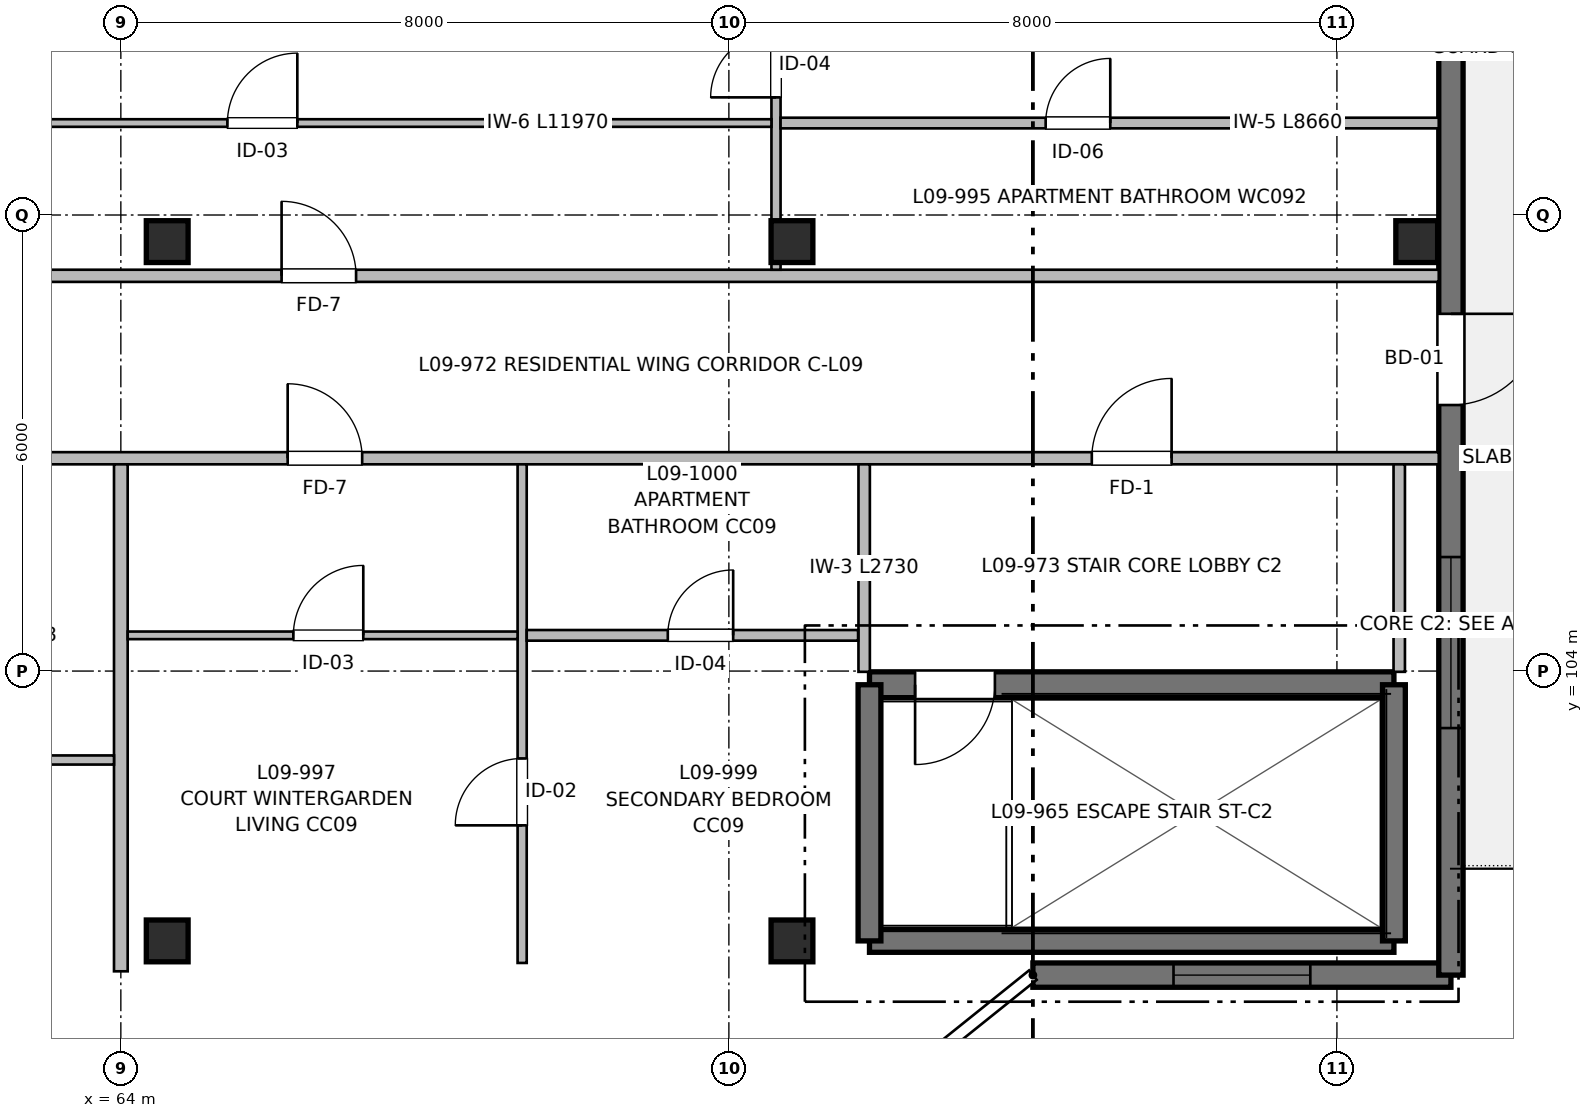
"""IFC4 building model, lengths in metres.
Left out: names, types, materials, properties, quantities, classifications, styles, units other than length and angle.
Written with IfcOpenShell. Run it as: python <this file> out.ifc"""

import sys

from ifc_helpers import new_model, si_unit, direction, frame, frame_2d, origin, origin_2d, place, context, subcontext, project, spatial, rectangle, extrude, element, fill, save


model = new_model("IFC4")
c1 = context("Model", 3, precision=1e-05, world=origin(), true_north=direction((0.0, 1.0)))
c2 = subcontext(c1, "Body", "Model", "MODEL_VIEW")
j1 = project(units=[si_unit("LENGTHUNIT", "METRE"), si_unit("PLANEANGLEUNIT", "RADIAN")], contexts=[c1])
p1 = place(None, origin())
s1 = spatial("IfcSite", under=j1, at=p1, CompositionType="ELEMENT")
p2 = place(p1, origin())
s2 = spatial("IfcBuilding", under=s1, at=p2, CompositionType="ELEMENT")
p3 = place(p2, frame((0.0, 0.0, 29.76)))
s3 = spatial("IfcBuildingStorey", under=s2, at=p3, CompositionType="ELEMENT", Elevation=29.76)
for number, where, z_axis, x_axis in (
    (1, (64.61, 100.45, 0.0), (0.0, 0.0, 1.0), (1.0, 0.0, 0.0)),
    (2, (64.61, 109.65, 0.0), (0.0, 0.0, 1.0), (1.0, 0.0, 0.0)),
    (3, (72.83, 100.45, 0.0), (0.0, 0.0, 1.0), (1.0, 0.0, 0.0)),
    (4, (72.83, 109.65, 0.0), (0.0, 0.0, 1.0), (1.0, 0.0, 0.0)),
    (5, (81.05, 109.65, 0.0), (0.0, 0.0, 1.0), (1.0, 0.0, 0.0)),
):
    element("IfcColumn", number, at=place(p3, frame(where, z_axis=z_axis, x_axis=x_axis)), inside=s3, PredefinedType="COLUMN", context=c2, shape_type="SweptSolid", body=[
        extrude(rectangle(XDim=0.55, YDim=0.55, at=origin_2d()), origin(), (0.0, 0.0, 1.0), 3.2),
    ])
p4 = place(p3, frame((73.85, 100.45, 0.0), z_axis=(0.0, 0.0, 1.0), x_axis=(1.0, 0.0, 0.0)))
e6 = element("IfcWall", 6, at=p4, inside=s3, PredefinedType="SHEAR", context=c2, shape_type="SweptSolid", body=[
    extrude(rectangle(XDim=6.9, YDim=0.3, at=frame_2d((3.45, 0.0))), origin(), (0.0, 0.0, 1.0), 3.2),
])
p5 = place(p3, frame((80.75, 103.82, 0.0), z_axis=(0.0, 0.0, 1.0), x_axis=(-1.0, 0.0, 0.0)))
e7 = element("IfcWall", 7, at=p5, inside=s3, PredefinedType="SHEAR", context=c2, shape_type="SweptSolid", body=[
    extrude(rectangle(XDim=6.9, YDim=0.34, at=frame_2d((3.45, 0.0))), origin(), (0.0, 0.0, 1.0), 3.2),
])
p6 = place(p5, frame((5.25, 0.0, 0.0)))
e8 = element("IfcOpeningElement", 8, at=p6, cuts=e7, PredefinedType="OPENING", context=c2, shape_type="SweptSolid", body=[
    extrude(rectangle(XDim=1.05, YDim=2.15, at=frame_2d((0.525, 1.075))), frame((0.0, 0.18, 0.0), z_axis=(0.0, -1.0, 0.0), x_axis=(1.0, 0.0, 0.0)), (0.0, 0.0, 1.0), 0.36),
])
for number, where, z_axis, x_axis in (
    (9, (73.85, 103.82, 0.0), (0.0, 0.0, 1.0), (0.0, -1.0, 0.0)),
    (10, (80.75, 100.45, 0.0), (0.0, 0.0, 1.0), (0.0, 1.0, 0.0)),
):
    element("IfcWall", number, at=place(p3, frame(where, z_axis=z_axis, x_axis=x_axis)), inside=s3, PredefinedType="SHEAR", context=c2, shape_type="SweptSolid", body=[
        extrude(rectangle(XDim=3.37, YDim=0.3, at=frame_2d((1.685, 0.0))), origin(), (0.0, 0.0, 1.0), 3.2),
    ])
p7 = place(p3, frame((81.5, 100.0, 0.0), z_axis=(0.0, 0.0, 1.0), x_axis=(-1.0, 0.0, 0.0)))
e11 = element("IfcWall", 11, at=p7, inside=s3, PredefinedType="SHEAR", context=c2, shape_type="SweptSolid", body=[
    extrude(rectangle(XDim=5.5, YDim=0.32, at=frame_2d((2.75, 0.0))), origin(), (0.0, 0.0, 1.0), 2.98),
])
p8 = place(p7, frame((1.85, 0.0, 0.72)))
e12 = element("IfcOpeningElement", 12, at=p8, cuts=e11, PredefinedType="OPENING", context=c2, shape_type="SweptSolid", body=[
    extrude(rectangle(XDim=1.8, YDim=1.5, at=frame_2d((0.9, 0.75))), frame((0.0, 0.17, 0.0), z_axis=(0.0, -1.0, 0.0), x_axis=(1.0, 0.0, 0.0)), (0.0, 0.0, 1.0), 0.34),
])
p9 = place(p3, frame((81.5, 113.6, 0.0), z_axis=(0.0, 0.0, 1.0), x_axis=(0.0, -1.0, 0.0)))
e13 = element("IfcWall", 13, at=p9, inside=s3, PredefinedType="SHEAR", context=c2, shape_type="SweptSolid", body=[
    extrude(rectangle(XDim=13.6, YDim=0.32, at=frame_2d((6.8, 0.0))), origin(), (0.0, 0.0, 1.0), 2.98),
])
p10 = place(p9, frame((4.9, 0.0, 0.0)))
e14 = element("IfcOpeningElement", 14, at=p10, cuts=e13, PredefinedType="OPENING", context=c2, shape_type="SweptSolid", body=[
    extrude(rectangle(XDim=1.2, YDim=2.2, at=frame_2d((0.6, 1.1))), frame((0.0, 0.17, 0.0), z_axis=(0.0, -1.0, 0.0), x_axis=(1.0, 0.0, 0.0)), (0.0, 0.0, 1.0), 0.34),
])
p11 = place(p9, frame((8.1, 0.0, 0.72)))
e15 = element("IfcOpeningElement", 15, at=p11, cuts=e13, PredefinedType="OPENING", context=c2, shape_type="SweptSolid", body=[
    extrude(rectangle(XDim=2.25, YDim=1.5, at=frame_2d((1.125, 0.75))), frame((0.0, 0.17, 0.0), z_axis=(0.0, -1.0, 0.0), x_axis=(1.0, 0.0, 0.0)), (0.0, 0.0, 1.0), 0.34),
])
p12 = place(p3, frame((57.2, 106.8, 0.0), z_axis=(0.0, 0.0, 1.0), x_axis=(1.0, 0.0, 0.0)))
e16 = element("IfcWall", 16, at=p12, inside=s3, PredefinedType="PARTITIONING", context=c2, shape_type="SweptSolid", body=[
    extrude(rectangle(XDim=24.14, YDim=0.16, at=frame_2d((12.07, 0.0))), origin(), (0.0, 0.0, 1.0), 2.935),
])
p13 = place(p12, frame((19.575, 0.0, 0.0)))
e17 = element("IfcOpeningElement", 17, at=p13, cuts=e16, PredefinedType="OPENING", context=c2, shape_type="SweptSolid", body=[
    extrude(rectangle(XDim=1.05, YDim=2.15, at=frame_2d((0.525, 1.075))), frame((0.0, 0.09, 0.0), z_axis=(0.0, -1.0, 0.0), x_axis=(1.0, 0.0, 0.0)), (0.0, 0.0, 1.0), 0.18),
])
p14 = place(p12, frame((8.995, 0.0, 0.0)))
e18 = element("IfcOpeningElement", 18, at=p14, cuts=e16, PredefinedType="OPENING", context=c2, shape_type="SweptSolid", body=[
    extrude(rectangle(XDim=0.98, YDim=2.15, at=frame_2d((0.49, 1.075))), frame((0.0, 0.09, 0.0), z_axis=(0.0, -1.0, 0.0), x_axis=(1.0, 0.0, 0.0)), (0.0, 0.0, 1.0), 0.18),
])
p15 = place(p3, frame((39.66, 109.2, 0.0), z_axis=(0.0, 0.0, 1.0), x_axis=(1.0, 0.0, 0.0)))
e19 = element("IfcWall", 19, at=p15, inside=s3, PredefinedType="PARTITIONING", context=c2, shape_type="SweptSolid", body=[
    extrude(rectangle(XDim=41.68, YDim=0.16, at=frame_2d((20.84, 0.0))), origin(), (0.0, 0.0, 1.0), 2.935),
])
p16 = place(p15, frame((5.525, 0.0, 0.0)))
e20 = element("IfcOpeningElement", 20, at=p16, cuts=e19, PredefinedType="OPENING", context=c2, shape_type="SweptSolid", body=[
    extrude(rectangle(XDim=0.98, YDim=2.15, at=frame_2d((0.49, 1.075))), frame((0.0, 0.09, 0.0), z_axis=(0.0, -1.0, 0.0), x_axis=(1.0, 0.0, 0.0)), (0.0, 0.0, 1.0), 0.18),
])
p17 = place(p15, frame((26.455, 0.0, 0.0)))
e21 = element("IfcOpeningElement", 21, at=p17, cuts=e19, PredefinedType="OPENING", context=c2, shape_type="SweptSolid", body=[
    extrude(rectangle(XDim=0.98, YDim=2.15, at=frame_2d((0.49, 1.075))), frame((0.0, 0.09, 0.0), z_axis=(0.0, -1.0, 0.0), x_axis=(1.0, 0.0, 0.0)), (0.0, 0.0, 1.0), 0.18),
])
p18 = place(p3, frame((64.0, 100.05, 0.0), z_axis=(0.0, 0.0, 1.0), x_axis=(0.0, 1.0, 0.0)))
e22 = element("IfcWall", 22, at=p18, inside=s3, PredefinedType="PARTITIONING", context=c2, shape_type="SweptSolid", body=[
    extrude(rectangle(XDim=6.67, YDim=0.18, at=frame_2d((3.335, 0.0))), origin(), (0.0, 0.0, 1.0), 2.935),
])
for number, where, z_axis, x_axis in (
    (23, (73.78, 103.99, 0.0), (0.0, 0.0, 1.0), (0.0, 1.0, 0.0)),
    (24, (80.82, 103.99, 0.0), (0.0, 0.0, 1.0), (0.0, 1.0, 0.0)),
):
    element("IfcWall", number, at=place(p3, frame(where, z_axis=z_axis, x_axis=x_axis)), inside=s3, PredefinedType="PARTITIONING", context=c2, shape_type="SweptSolid", body=[
        extrude(rectangle(XDim=2.73, YDim=0.15, at=frame_2d((1.365, 0.0))), origin(), (0.0, 0.0, 1.0), 2.935),
    ])
p19 = place(p3, frame((59.72, 102.83, 0.0), z_axis=(0.0, 0.0, 1.0), x_axis=(1.0, 0.0, 0.0)))
e25 = element("IfcWall", 25, at=p19, inside=s3, PredefinedType="PARTITIONING", context=c2, shape_type="SweptSolid", body=[
    extrude(rectangle(XDim=4.19, YDim=0.12, at=frame_2d((2.095, 0.0))), origin(), (0.0, 0.0, 1.0), 2.935),
])
p20 = place(p19, frame((1.655, 0.0, 0.0)))
e26 = element("IfcOpeningElement", 26, at=p20, cuts=e25, PredefinedType="OPENING", context=c2, shape_type="SweptSolid", body=[
    extrude(rectangle(XDim=0.88, YDim=2.1, at=frame_2d((0.44, 1.05))), frame((0.0, 0.07, 0.0), z_axis=(0.0, -1.0, 0.0), x_axis=(1.0, 0.0, 0.0)), (0.0, 0.0, 1.0), 0.14),
])
p21 = place(p3, frame((72.62, 109.28, 0.0), z_axis=(0.0, 0.0, 1.0), x_axis=(0.0, 1.0, 0.0)))
e27 = element("IfcWall", 27, at=p21, inside=s3, PredefinedType="PARTITIONING", context=c2, shape_type="SweptSolid", body=[
    extrude(rectangle(XDim=4.19, YDim=0.12, at=frame_2d((2.095, 0.0))), origin(), (0.0, 0.0, 1.0), 2.935),
])
p22 = place(p21, frame((2.268, 0.0, 0.0)))
e28 = element("IfcOpeningElement", 28, at=p22, cuts=e27, PredefinedType="OPENING", context=c2, shape_type="SweptSolid", body=[
    extrude(rectangle(XDim=0.86, YDim=2.1, at=frame_2d((0.43, 1.05))), frame((0.0, 0.07, 0.0), z_axis=(0.0, -1.0, 0.0), x_axis=(1.0, 0.0, 0.0)), (0.0, 0.0, 1.0), 0.14),
])
p23 = place(p3, frame((72.68, 111.21, 0.0), z_axis=(0.0, 0.0, 1.0), x_axis=(1.0, 0.0, 0.0)))
e29 = element("IfcWall", 29, at=p23, inside=s3, PredefinedType="PARTITIONING", context=c2, shape_type="SweptSolid", body=[
    extrude(rectangle(XDim=8.66, YDim=0.14, at=frame_2d((4.33, 0.0))), origin(), (0.0, 0.0, 1.0), 2.935),
])
p24 = place(p23, frame((3.488, 0.0, 0.0)))
e30 = element("IfcOpeningElement", 30, at=p24, cuts=e29, PredefinedType="OPENING", context=c2, shape_type="SweptSolid", body=[
    extrude(rectangle(XDim=0.85, YDim=2.05, at=frame_2d((0.425, 1.025))), frame((0.0, 0.08, 0.0), z_axis=(0.0, -1.0, 0.0), x_axis=(1.0, 0.0, 0.0)), (0.0, 0.0, 1.0), 0.16),
])
p25 = place(p3, frame((60.59, 111.21, 0.0), z_axis=(0.0, 0.0, 1.0), x_axis=(1.0, 0.0, 0.0)))
e31 = element("IfcWall", 31, at=p25, inside=s3, PredefinedType="PARTITIONING", context=c2, shape_type="SweptSolid", body=[
    extrude(rectangle(XDim=11.97, YDim=0.1, at=frame_2d((5.985, 0.0))), origin(), (0.0, 0.0, 1.0), 2.935),
])
p26 = place(p25, frame((4.812, 0.0, 0.0)))
e32 = element("IfcOpeningElement", 32, at=p26, cuts=e31, PredefinedType="OPENING", context=c2, shape_type="SweptSolid", body=[
    extrude(rectangle(XDim=0.92, YDim=2.1, at=frame_2d((0.46, 1.05))), frame((0.0, 0.06, 0.0), z_axis=(0.0, -1.0, 0.0), x_axis=(1.0, 0.0, 0.0)), (0.0, 0.0, 1.0), 0.12),
])
p27 = place(p3, frame((69.28, 100.16, 0.0), z_axis=(0.0, 0.0, 1.0), x_axis=(0.0, 1.0, 0.0)))
e33 = element("IfcWall", 33, at=p27, inside=s3, PredefinedType="PARTITIONING", context=c2, shape_type="SweptSolid", body=[
    extrude(rectangle(XDim=6.56, YDim=0.12, at=frame_2d((3.28, 0.0))), origin(), (0.0, 0.0, 1.0), 2.935),
])
p28 = place(p27, frame((1.81, 0.0, 0.0)))
e34 = element("IfcOpeningElement", 34, at=p28, cuts=e33, PredefinedType="OPENING", context=c2, shape_type="SweptSolid", body=[
    extrude(rectangle(XDim=0.88, YDim=2.1, at=frame_2d((0.44, 1.05))), frame((0.0, 0.07, 0.0), z_axis=(0.0, -1.0, 0.0), x_axis=(1.0, 0.0, 0.0)), (0.0, 0.0, 1.0), 0.14),
])
p29 = place(p3, frame((69.34, 104.47, 0.0), z_axis=(0.0, 0.0, 1.0), x_axis=(1.0, 0.0, 0.0)))
e35 = element("IfcWall", 35, at=p29, inside=s3, PredefinedType="PARTITIONING", context=c2, shape_type="SweptSolid", body=[
    extrude(rectangle(XDim=4.36, YDim=0.14, at=frame_2d((2.18, 0.0))), origin(), (0.0, 0.0, 1.0), 2.935),
])
p30 = place(p29, frame((1.856, 0.0, 0.0)))
e36 = element("IfcOpeningElement", 36, at=p30, cuts=e35, PredefinedType="OPENING", context=c2, shape_type="SweptSolid", body=[
    extrude(rectangle(XDim=0.86, YDim=2.1, at=frame_2d((0.43, 1.05))), frame((0.0, 0.08, 0.0), z_axis=(0.0, -1.0, 0.0), x_axis=(1.0, 0.0, 0.0)), (0.0, 0.0, 1.0), 0.16),
])
p31 = place(p3, frame((64.09, 104.47, 0.0), z_axis=(0.0, 0.0, 1.0), x_axis=(1.0, 0.0, 0.0)))
e37 = element("IfcWall", 37, at=p31, inside=s3, PredefinedType="PARTITIONING", context=c2, shape_type="SweptSolid", body=[
    extrude(rectangle(XDim=5.13, YDim=0.1, at=frame_2d((2.565, 0.0))), origin(), (0.0, 0.0, 1.0), 2.935),
])
p32 = place(p31, frame((2.18, 0.0, 0.0)))
e38 = element("IfcOpeningElement", 38, at=p32, cuts=e37, PredefinedType="OPENING", context=c2, shape_type="SweptSolid", body=[
    extrude(rectangle(XDim=0.92, YDim=2.1, at=frame_2d((0.46, 1.05))), frame((0.0, 0.06, 0.0), z_axis=(0.0, -1.0, 0.0), x_axis=(1.0, 0.0, 0.0)), (0.0, 0.0, 1.0), 0.12),
])
p33 = place(p6, origin())
e39 = element("IfcDoor", 39, at=p33, inside=s3, OperationType="SINGLE_SWING_RIGHT", PredefinedType="DOOR", context=c2, shape_type="SweptSolid", body=[
    extrude(rectangle(XDim=1.05, YDim=2.15, at=frame_2d((0.525, 1.075))), frame((0.0, 0.025, 0.0), z_axis=(0.0, -1.0, 0.0), x_axis=(1.0, 0.0, 0.0)), (0.0, 0.0, 1.0), 0.05),
])
fill(e8, e39)
p34 = place(p8, origin())
e40 = element("IfcWindow", 40, at=p34, inside=s3, PartitioningType="SINGLE_PANEL", PredefinedType="WINDOW", context=c2, shape_type="SweptSolid", body=[
    extrude(rectangle(XDim=1.8, YDim=1.5, at=frame_2d((0.9, 0.75))), frame((0.0, 0.03, 0.0), z_axis=(0.0, -1.0, 0.0), x_axis=(1.0, 0.0, 0.0)), (0.0, 0.0, 1.0), 0.06),
])
fill(e12, e40)
p35 = place(p10, origin())
e41 = element("IfcDoor", 41, at=p35, inside=s3, OperationType="SINGLE_SWING_LEFT", PredefinedType="DOOR", context=c2, shape_type="SweptSolid", body=[
    extrude(rectangle(XDim=1.2, YDim=2.2, at=frame_2d((0.6, 1.1))), frame((0.0, 0.025, 0.0), z_axis=(0.0, -1.0, 0.0), x_axis=(1.0, 0.0, 0.0)), (0.0, 0.0, 1.0), 0.05),
])
fill(e14, e41)
p36 = place(p11, origin())
e42 = element("IfcWindow", 42, at=p36, inside=s3, PartitioningType="SINGLE_PANEL", PredefinedType="WINDOW", context=c2, shape_type="SweptSolid", body=[
    extrude(rectangle(XDim=2.25, YDim=1.5, at=frame_2d((1.125, 0.75))), frame((0.0, 0.03, 0.0), z_axis=(0.0, -1.0, 0.0), x_axis=(1.0, 0.0, 0.0)), (0.0, 0.0, 1.0), 0.06),
])
fill(e15, e42)
p37 = place(p13, origin())
e43 = element("IfcDoor", 43, at=p37, inside=s3, OperationType="SINGLE_SWING_RIGHT", PredefinedType="DOOR", context=c2, shape_type="SweptSolid", body=[
    extrude(rectangle(XDim=1.05, YDim=2.15, at=frame_2d((0.525, 1.075))), frame((0.0, 0.025, 0.0), z_axis=(0.0, -1.0, 0.0), x_axis=(1.0, 0.0, 0.0)), (0.0, 0.0, 1.0), 0.05),
])
fill(e17, e43)
p38 = place(p17, origin())
e44 = element("IfcDoor", 44, at=p38, inside=s3, OperationType="SINGLE_SWING_LEFT", PredefinedType="DOOR", context=c2, shape_type="SweptSolid", body=[
    extrude(rectangle(XDim=0.98, YDim=2.15, at=frame_2d((0.49, 1.075))), frame((0.0, 0.025, 0.0), z_axis=(0.0, -1.0, 0.0), x_axis=(1.0, 0.0, 0.0)), (0.0, 0.0, 1.0), 0.05),
])
fill(e21, e44)
p39 = place(p26, origin())
e45 = element("IfcDoor", 45, at=p39, inside=s3, OperationType="SINGLE_SWING_RIGHT", PredefinedType="DOOR", context=c2, shape_type="SweptSolid", body=[
    extrude(rectangle(XDim=0.92, YDim=2.1, at=frame_2d((0.46, 1.05))), frame((0.0, 0.025, 0.0), z_axis=(0.0, -1.0, 0.0), x_axis=(1.0, 0.0, 0.0)), (0.0, 0.0, 1.0), 0.05),
])
fill(e32, e45)
p40 = place(p22, origin())
e46 = element("IfcDoor", 46, at=p40, inside=s3, OperationType="SINGLE_SWING_LEFT", PredefinedType="DOOR", context=c2, shape_type="SweptSolid", body=[
    extrude(rectangle(XDim=0.86, YDim=2.1, at=frame_2d((0.43, 1.05))), frame((0.0, 0.025, 0.0), z_axis=(0.0, -1.0, 0.0), x_axis=(1.0, 0.0, 0.0)), (0.0, 0.0, 1.0), 0.05),
])
fill(e28, e46)
p41 = place(p24, origin())
e47 = element("IfcDoor", 47, at=p41, inside=s3, OperationType="SINGLE_SWING_RIGHT", PredefinedType="DOOR", context=c2, shape_type="SweptSolid", body=[
    extrude(rectangle(XDim=0.85, YDim=2.05, at=frame_2d((0.425, 1.025))), frame((0.0, 0.025, 0.0), z_axis=(0.0, -1.0, 0.0), x_axis=(1.0, 0.0, 0.0)), (0.0, 0.0, 1.0), 0.05),
])
fill(e30, e47)
p42 = place(p14, origin())
e48 = element("IfcDoor", 48, at=p42, inside=s3, OperationType="SINGLE_SWING_LEFT", PredefinedType="DOOR", context=c2, shape_type="SweptSolid", body=[
    extrude(rectangle(XDim=0.98, YDim=2.15, at=frame_2d((0.49, 1.075))), frame((0.0, 0.025, 0.0), z_axis=(0.0, -1.0, 0.0), x_axis=(1.0, 0.0, 0.0)), (0.0, 0.0, 1.0), 0.05),
])
fill(e18, e48)
p43 = place(p32, origin())
e49 = element("IfcDoor", 49, at=p43, inside=s3, OperationType="SINGLE_SWING_RIGHT", PredefinedType="DOOR", context=c2, shape_type="SweptSolid", body=[
    extrude(rectangle(XDim=0.92, YDim=2.1, at=frame_2d((0.46, 1.05))), frame((0.0, 0.025, 0.0), z_axis=(0.0, -1.0, 0.0), x_axis=(1.0, 0.0, 0.0)), (0.0, 0.0, 1.0), 0.05),
])
fill(e38, e49)
p44 = place(p28, origin())
e50 = element("IfcDoor", 50, at=p44, inside=s3, OperationType="SINGLE_SWING_LEFT", PredefinedType="DOOR", context=c2, shape_type="SweptSolid", body=[
    extrude(rectangle(XDim=0.88, YDim=2.1, at=frame_2d((0.44, 1.05))), frame((0.0, 0.025, 0.0), z_axis=(0.0, -1.0, 0.0), x_axis=(1.0, 0.0, 0.0)), (0.0, 0.0, 1.0), 0.05),
])
fill(e34, e50)
p45 = place(p30, origin())
e51 = element("IfcDoor", 51, at=p45, inside=s3, OperationType="SINGLE_SWING_RIGHT", PredefinedType="DOOR", context=c2, shape_type="SweptSolid", body=[
    extrude(rectangle(XDim=0.86, YDim=2.1, at=frame_2d((0.43, 1.05))), frame((0.0, 0.025, 0.0), z_axis=(0.0, -1.0, 0.0), x_axis=(1.0, 0.0, 0.0)), (0.0, 0.0, 1.0), 0.05),
])
fill(e36, e51)
save(model, sys.argv[1])
